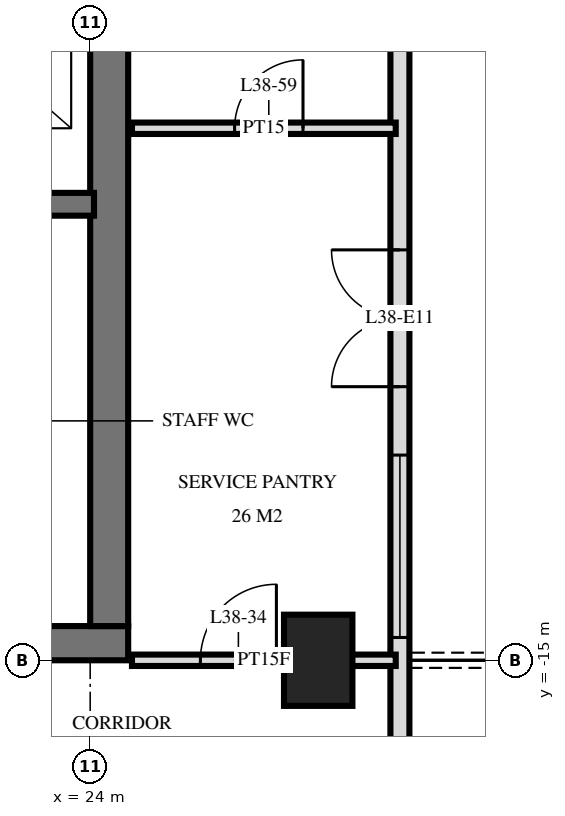
"""IFC4 building model, lengths in metres.
Left out: names, types, materials, properties, quantities, classifications, styles, units other than length and angle.
Written with IfcOpenShell. Run it as: python <this file> out.ifc"""

import sys

from ifc_helpers import new_model, si_unit, direction, frame, frame_2d, origin, origin_2d, place, context, subcontext, project, spatial, rectangle, extrude, element, fill, save


model = new_model("IFC4")
c1 = context("Model", 3, precision=1e-05, world=origin(), true_north=direction((0.0, 1.0)))
c2 = subcontext(c1, "Body", "Model", "MODEL_VIEW")
j1 = project(units=[si_unit("LENGTHUNIT", "METRE"), si_unit("PLANEANGLEUNIT", "RADIAN")], contexts=[c1])
p1 = place(None, origin())
s1 = spatial("IfcSite", under=j1, at=p1, CompositionType="ELEMENT")
p2 = place(p1, origin())
s2 = spatial("IfcBuilding", under=s1, at=p2, CompositionType="ELEMENT")
p3 = place(p2, frame((0.0, 0.0, 148.8)))
s3 = spatial("IfcBuildingStorey", under=s2, at=p3, CompositionType="ELEMENT", Elevation=148.8)
p4 = place(p3, frame((27.0, -15.0, 0.0), z_axis=(0.0, 0.0, 1.0), x_axis=(0.0, 1.0, 0.0)))
e1 = element("IfcColumn", 1, at=p4, inside=s3, PredefinedType="COLUMN", context=c2, shape_type="SweptSolid", body=[
    extrude(rectangle(XDim=1.2, YDim=0.9, at=origin_2d()), origin(), (0.0, 0.0, 1.0), 3.6),
])
p5 = place(p3, frame((10.0, -14.775, 0.0), z_axis=(0.0, 0.0, 1.0), x_axis=(1.0, 0.0, 0.0)))
e2 = element("IfcWall", 2, at=p5, inside=s3, PredefinedType="SHEAR", context=c2, shape_type="SweptSolid", body=[
    extrude(rectangle(XDim=14.5, YDim=0.45, at=frame_2d((7.25, 0.0))), origin(), (0.0, 0.0, 1.0), 3.6),
])
p6 = place(p5, frame((7.1, 0.0, 0.0)))
e3 = element("IfcOpeningElement", 3, at=p6, cuts=e2, PredefinedType="OPENING", context=c2, shape_type="SweptSolid", body=[
    extrude(rectangle(XDim=1.2, YDim=2.1, at=frame_2d((0.6, 1.05))), frame((0.0, 0.235, 0.0), z_axis=(0.0, -1.0, 0.0), x_axis=(1.0, 0.0, 0.0)), (0.0, 0.0, 1.0), 0.47),
])
p7 = place(p5, frame((4.15, 0.0, 0.0)))
e4 = element("IfcOpeningElement", 4, at=p7, cuts=e2, PredefinedType="OPENING", context=c2, shape_type="SweptSolid", body=[
    extrude(rectangle(XDim=1.1, YDim=2.1, at=frame_2d((0.55, 1.05))), frame((0.0, 0.235, 0.0), z_axis=(0.0, -1.0, 0.0), x_axis=(1.0, 0.0, 0.0)), (0.0, 0.0, 1.0), 0.47),
])
p8 = place(p5, frame((10.1, 0.0, 0.0)))
e5 = element("IfcOpeningElement", 5, at=p8, cuts=e2, PredefinedType="OPENING", context=c2, shape_type="SweptSolid", body=[
    extrude(rectangle(XDim=0.9, YDim=2.1, at=frame_2d((0.45, 1.05))), frame((0.0, 0.235, 0.0), z_axis=(0.0, -1.0, 0.0), x_axis=(1.0, 0.0, 0.0)), (0.0, 0.0, 1.0), 0.47),
])
p9 = place(p5, frame((12.45, 0.0, 0.0)))
e6 = element("IfcOpeningElement", 6, at=p9, cuts=e2, PredefinedType="OPENING", context=c2, shape_type="SweptSolid", body=[
    extrude(rectangle(XDim=1.0, YDim=2.1, at=frame_2d((0.5, 1.05))), frame((0.0, 0.235, 0.0), z_axis=(0.0, -1.0, 0.0), x_axis=(1.0, 0.0, 0.0)), (0.0, 0.0, 1.0), 0.47),
])
p10 = place(p3, frame((24.25, -14.55, 0.0), z_axis=(0.0, 0.0, 1.0), x_axis=(0.0, 1.0, 0.0)))
e7 = element("IfcWall", 7, at=p10, inside=s3, PredefinedType="SHEAR", context=c2, shape_type="SweptSolid", body=[
    extrude(rectangle(XDim=14.1, YDim=0.5, at=frame_2d((7.05, 0.0))), origin(), (0.0, 0.0, 1.0), 3.6),
])
p11 = place(p3, frame((10.35, -9.0, 0.0), z_axis=(0.0, 0.0, 1.0), x_axis=(1.0, 0.0, 0.0)))
e8 = element("IfcWall", 8, at=p11, inside=s3, PredefinedType="SHEAR", context=c2, shape_type="SweptSolid", body=[
    extrude(rectangle(XDim=13.7, YDim=0.3, at=frame_2d((6.85, 0.0))), origin(), (0.0, 0.0, 1.0), 3.6),
])
p12 = place(p11, frame((3.8, 0.0, 0.0)))
e9 = element("IfcOpeningElement", 9, at=p12, cuts=e8, PredefinedType="OPENING", context=c2, shape_type="SweptSolid", body=[
    extrude(rectangle(XDim=1.1, YDim=2.1, at=frame_2d((0.55, 1.05))), frame((0.0, 0.16, 0.0), z_axis=(0.0, -1.0, 0.0), x_axis=(1.0, 0.0, 0.0)), (0.0, 0.0, 1.0), 0.32),
])
p13 = place(p3, frame((28.075, -29.275, 0.0), z_axis=(0.0, 0.0, 1.0), x_axis=(0.0, 1.0, 0.0)))
e10 = element("IfcWall", 10, at=p13, inside=s3, PredefinedType="SOLIDWALL", context=c2, shape_type="SweptSolid", body=[
    extrude(rectangle(XDim=25.951, YDim=0.25, at=frame_2d((12.975, 0.0))), origin(), (0.0, 0.0, 1.0), 3.32),
])
p14 = place(p13, frame((0.575, 0.0, 0.0)))
e11 = element("IfcOpeningElement", 11, at=p14, cuts=e10, PredefinedType="OPENING", context=c2, shape_type="SweptSolid", body=[
    extrude(rectangle(XDim=1.8, YDim=2.4, at=frame_2d((0.9, 1.2))), frame((0.0, 0.135, 0.0), z_axis=(0.0, -1.0, 0.0), x_axis=(1.0, 0.0, 0.0)), (0.0, 0.0, 1.0), 0.27),
])
p15 = place(p13, frame((3.325, 0.0, 0.3)))
e12 = element("IfcOpeningElement", 12, at=p15, cuts=e10, PredefinedType="OPENING", context=c2, shape_type="SweptSolid", body=[
    extrude(rectangle(XDim=1.8, YDim=2.1, at=frame_2d((0.9, 1.05))), frame((0.0, 0.135, 0.0), z_axis=(0.0, -1.0, 0.0), x_axis=(1.0, 0.0, 0.0)), (0.0, 0.0, 1.0), 0.27),
])
p16 = place(p13, frame((9.475, 0.0, 0.0)))
e13 = element("IfcOpeningElement", 13, at=p16, cuts=e10, PredefinedType="OPENING", context=c2, shape_type="SweptSolid", body=[
    extrude(rectangle(XDim=1.8, YDim=2.4, at=frame_2d((0.9, 1.2))), frame((0.0, 0.135, 0.0), z_axis=(0.0, -1.0, 0.0), x_axis=(1.0, 0.0, 0.0)), (0.0, 0.0, 1.0), 0.27),
])
p17 = place(p13, frame((14.575, 0.0, 0.3)))
e14 = element("IfcOpeningElement", 14, at=p17, cuts=e10, PredefinedType="OPENING", context=c2, shape_type="SweptSolid", body=[
    extrude(rectangle(XDim=2.4, YDim=2.1, at=frame_2d((1.2, 1.05))), frame((0.0, 0.135, 0.0), z_axis=(0.0, -1.0, 0.0), x_axis=(1.0, 0.0, 0.0)), (0.0, 0.0, 1.0), 0.27),
])
p18 = place(p13, frame((17.875, 0.0, 0.0)))
e15 = element("IfcOpeningElement", 15, at=p18, cuts=e10, PredefinedType="OPENING", context=c2, shape_type="SweptSolid", body=[
    extrude(rectangle(XDim=1.8, YDim=2.4, at=frame_2d((0.9, 1.2))), frame((0.0, 0.135, 0.0), z_axis=(0.0, -1.0, 0.0), x_axis=(1.0, 0.0, 0.0)), (0.0, 0.0, 1.0), 0.27),
])
p19 = place(p3, frame((24.55, -15.0, 0.0), z_axis=(0.0, 0.0, 1.0), x_axis=(1.0, 0.0, 0.0)))
e16 = element("IfcWall", 16, at=p19, inside=s3, PredefinedType="PARTITIONING", context=c2, shape_type="SweptSolid", body=[
    extrude(rectangle(XDim=3.47, YDim=0.15, at=frame_2d((1.735, 0.0))), origin(), (0.0, 0.0, 1.0), 3.32),
])
p20 = place(p19, frame((0.9, 0.0, 0.0)))
e17 = element("IfcOpeningElement", 17, at=p20, cuts=e16, PredefinedType="OPENING", context=c2, shape_type="SweptSolid", body=[
    extrude(rectangle(XDim=1.0, YDim=2.1, at=frame_2d((0.5, 1.05))), frame((0.0, 0.085, 0.0), z_axis=(0.0, -1.0, 0.0), x_axis=(1.0, 0.0, 0.0)), (0.0, 0.0, 1.0), 0.17),
])
p21 = place(p3, frame((24.55, -8.0, 0.0), z_axis=(0.0, 0.0, 1.0), x_axis=(1.0, 0.0, 0.0)))
e18 = element("IfcWall", 18, at=p21, inside=s3, PredefinedType="PARTITIONING", context=c2, shape_type="SweptSolid", body=[
    extrude(rectangle(XDim=3.47, YDim=0.15, at=frame_2d((1.735, 0.0))), origin(), (0.0, 0.0, 1.0), 3.32),
])
p22 = place(p21, frame((1.35, 0.0, 0.0)))
e19 = element("IfcOpeningElement", 19, at=p22, cuts=e18, PredefinedType="OPENING", context=c2, shape_type="SweptSolid", body=[
    extrude(rectangle(XDim=0.9, YDim=2.1, at=frame_2d((0.45, 1.05))), frame((0.0, 0.085, 0.0), z_axis=(0.0, -1.0, 0.0), x_axis=(1.0, 0.0, 0.0)), (0.0, 0.0, 1.0), 0.17),
])
p23 = place(p17, origin())
e20 = element("IfcWindow", 20, at=p23, inside=s3, PartitioningType="SINGLE_PANEL", PredefinedType="WINDOW", context=c2, shape_type="SweptSolid", body=[
    extrude(rectangle(XDim=2.4, YDim=2.1, at=frame_2d((1.2, 1.05))), frame((0.0, 0.03, 0.0), z_axis=(0.0, -1.0, 0.0), x_axis=(1.0, 0.0, 0.0)), (0.0, 0.0, 1.0), 0.06),
])
fill(e14, e20)
p24 = place(p18, origin())
e21 = element("IfcDoor", 21, at=p24, inside=s3, OperationType="DOUBLE_DOOR_SINGLE_SWING", PredefinedType="DOOR", context=c2, shape_type="SweptSolid", body=[
    extrude(rectangle(XDim=1.8, YDim=2.4, at=frame_2d((0.9, 1.2))), frame((0.0, 0.025, 0.0), z_axis=(0.0, -1.0, 0.0), x_axis=(1.0, 0.0, 0.0)), (0.0, 0.0, 1.0), 0.05),
])
fill(e15, e21)
p25 = place(p20, origin())
e22 = element("IfcDoor", 22, at=p25, inside=s3, OperationType="SINGLE_SWING_LEFT", PredefinedType="DOOR", context=c2, shape_type="SweptSolid", body=[
    extrude(rectangle(XDim=1.0, YDim=2.1, at=frame_2d((0.5, 1.05))), frame((0.0, 0.025, 0.0), z_axis=(0.0, -1.0, 0.0), x_axis=(1.0, 0.0, 0.0)), (0.0, 0.0, 1.0), 0.05),
])
fill(e17, e22)
p26 = place(p22, origin())
e23 = element("IfcDoor", 23, at=p26, inside=s3, OperationType="SINGLE_SWING_LEFT", PredefinedType="DOOR", context=c2, shape_type="SweptSolid", body=[
    extrude(rectangle(XDim=0.9, YDim=2.1, at=frame_2d((0.45, 1.05))), frame((0.0, 0.025, 0.0), z_axis=(0.0, -1.0, 0.0), x_axis=(1.0, 0.0, 0.0)), (0.0, 0.0, 1.0), 0.05),
])
fill(e19, e23)
save(model, sys.argv[1])
